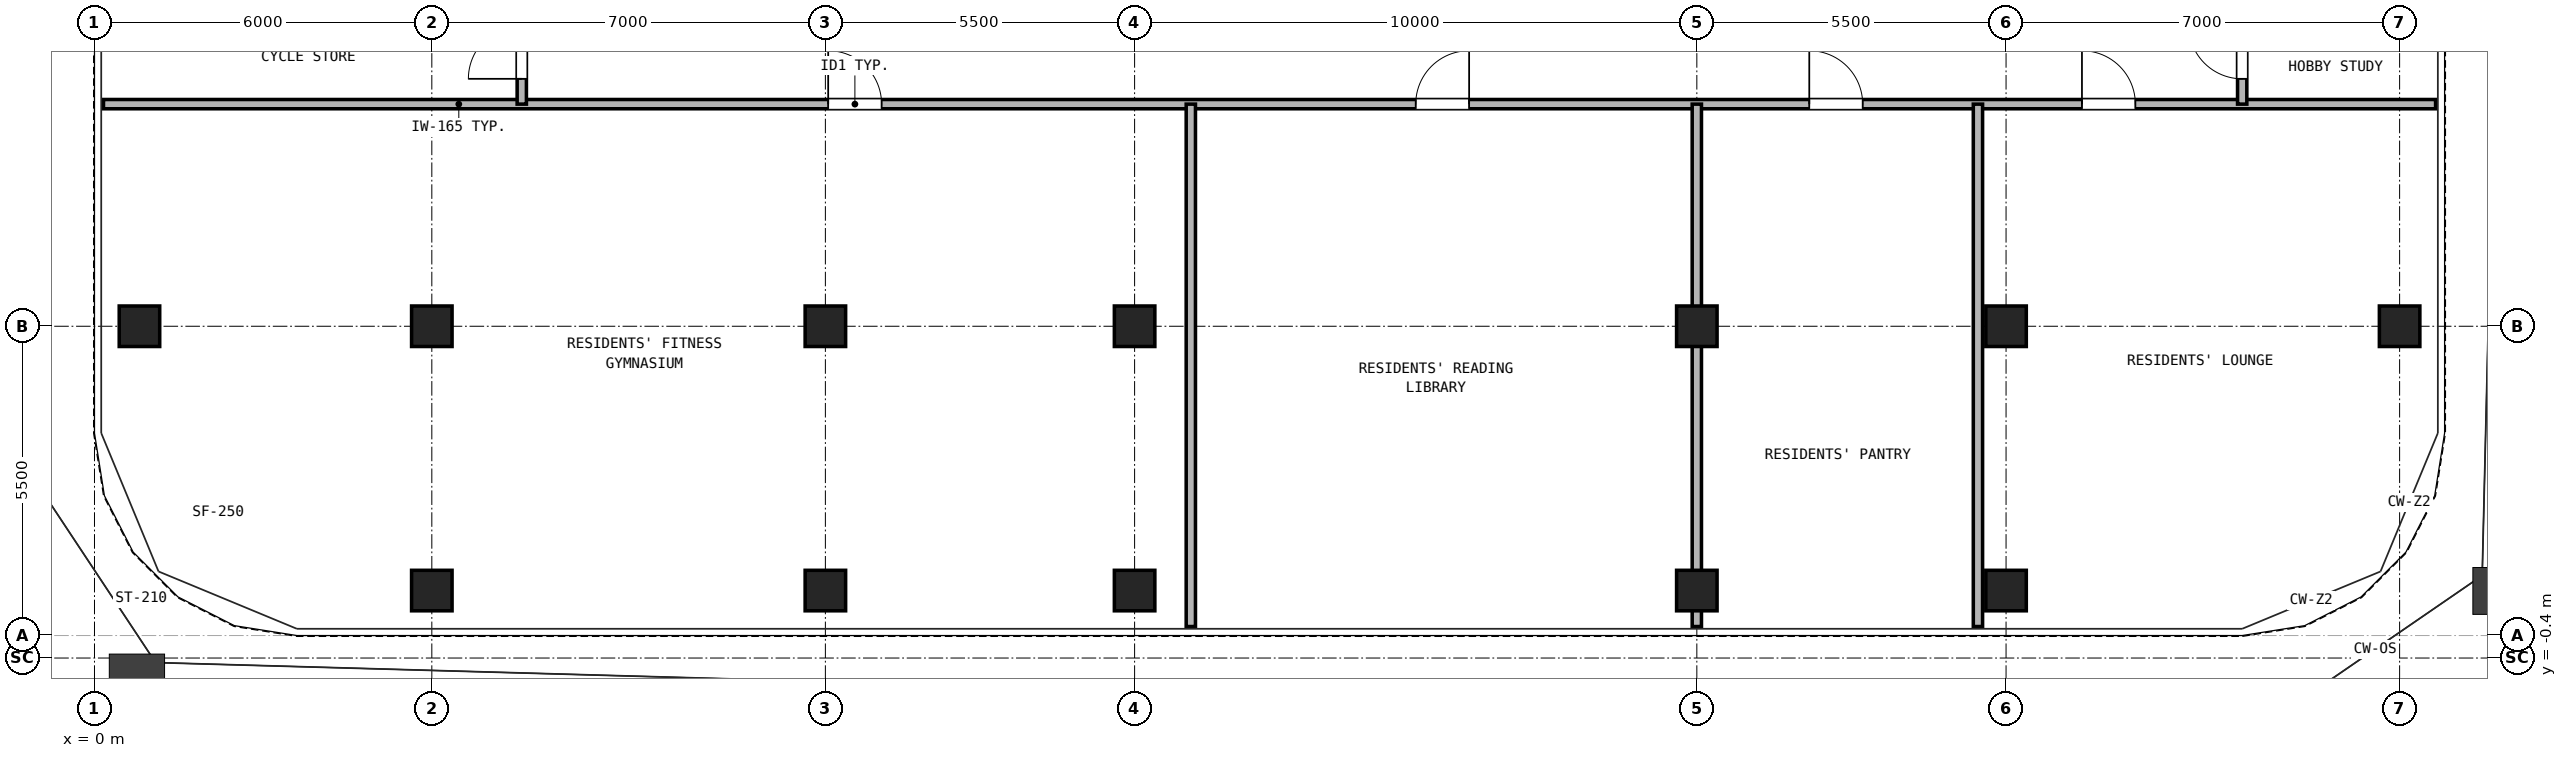
"""IFC4 building model, lengths in metres.
Left out: names, types, materials, properties, quantities, classifications, styles, units other than length and angle.
Written with IfcOpenShell. Run it as: python <this file> out.ifc"""

import sys

from ifc_helpers import new_model, si_unit, direction, frame, frame_2d, origin, origin_2d, place, context, subcontext, project, spatial, rectangle, hollow_rectangle, extrude, source, transform, mapped, element, fill, save


model = new_model("IFC4")
c1 = context("Model", 3, precision=1e-05, world=origin(), true_north=direction((0.0, 1.0)))
c2 = subcontext(c1, "Body", "Model", "MODEL_VIEW")
j1 = project(units=[si_unit("LENGTHUNIT", "METRE"), si_unit("PLANEANGLEUNIT", "RADIAN")], contexts=[c1])
p1 = place(None, origin())
s1 = spatial("IfcSite", under=j1, at=p1, CompositionType="ELEMENT")
p2 = place(p1, origin())
s2 = spatial("IfcBuilding", under=s1, at=p2, CompositionType="ELEMENT")
p3 = place(p2, frame((0.0, 0.0, 168.9)))
s3 = spatial("IfcBuildingStorey", under=s2, at=p3, CompositionType="ELEMENT", Elevation=168.9)
m1 = source(origin(), c2, "Body", "SweptSolid", [
    extrude(hollow_rectangle(XDim=0.72, YDim=0.72, WallThickness=0.04, at=origin_2d()), origin(), (0.0, 0.0, 1.0), 2.95),
])
for number, where, z_axis, x_axis in (
    (1, (6.0, 0.8, 0.0), (0.0, 0.0, 1.0), (1.0, 0.0, 0.0)),
    (2, (13.0, 0.8, 0.0), (0.0, 0.0, 1.0), (1.0, 0.0, 0.0)),
    (3, (18.5, 0.8, 0.0), (0.0, 0.0, 1.0), (1.0, 0.0, 0.0)),
    (4, (28.5, 0.8, 0.0), (0.0, 0.0, 1.0), (1.0, 0.0, 0.0)),
    (5, (34.0, 0.8, 0.0), (0.0, 0.0, 1.0), (1.0, 0.0, 0.0)),
    (6, (0.8, 5.5, 0.0), (0.0, 0.0, 1.0), (1.0, 0.0, 0.0)),
    (7, (41.0, 5.5, 0.0), (0.0, 0.0, 1.0), (1.0, 0.0, 0.0)),
    (8, (6.0, 5.5, 0.0), (0.0, 0.0, 1.0), (1.0, 0.0, 0.0)),
    (9, (13.0, 5.5, 0.0), (0.0, 0.0, 1.0), (1.0, 0.0, 0.0)),
    (10, (18.5, 5.5, 0.0), (0.0, 0.0, 1.0), (1.0, 0.0, 0.0)),
    (11, (28.5, 5.5, 0.0), (0.0, 0.0, 1.0), (1.0, 0.0, 0.0)),
    (12, (34.0, 5.5, 0.0), (0.0, 0.0, 1.0), (1.0, 0.0, 0.0)),
):
    element("IfcColumn", number, at=place(p3, frame(where, z_axis=z_axis, x_axis=x_axis)), inside=s3, PredefinedType="COLUMN", context=c2, shape_type="MappedRepresentation", body=[
        mapped(m1, transform((0.0, 0.0, 0.0), x_axis=(1.0, 0.0, 0.0), y_axis=(0.0, 1.0, 0.0), z_axis=(0.0, 0.0, 1.0), scale=1.0)),
    ])
p4 = place(p3, frame((0.16, 9.45, 0.0), z_axis=(0.0, 0.0, 1.0), x_axis=(1.0, 0.0, 0.0)))
e13 = element("IfcWall", 13, at=p4, inside=s3, PredefinedType="PARTITIONING", context=c2, shape_type="SweptSolid", body=[
    extrude(rectangle(XDim=41.48, YDim=0.165, at=frame_2d((20.74, 0.0))), origin(), (0.0, 0.0, 1.0), 2.95),
])
p5 = place(p4, frame((12.89, 0.0, 0.0)))
e14 = element("IfcOpeningElement", 14, at=p5, cuts=e13, PredefinedType="OPENING", context=c2, shape_type="SweptSolid", body=[
    extrude(rectangle(XDim=0.95, YDim=2.15, at=frame_2d((0.475, 1.075))), frame((0.0, 0.093, 0.0), z_axis=(0.0, -1.0, 0.0), x_axis=(1.0, 0.0, 0.0)), (0.0, 0.0, 1.0), 0.185),
])
p6 = place(p4, frame((23.34, 0.0, 0.0)))
e15 = element("IfcOpeningElement", 15, at=p6, cuts=e13, PredefinedType="OPENING", context=c2, shape_type="SweptSolid", body=[
    extrude(rectangle(XDim=0.95, YDim=2.15, at=frame_2d((0.475, 1.075))), frame((0.0, 0.093, 0.0), z_axis=(0.0, -1.0, 0.0), x_axis=(1.0, 0.0, 0.0)), (0.0, 0.0, 1.0), 0.185),
])
p7 = place(p4, frame((30.34, 0.0, 0.0)))
e16 = element("IfcOpeningElement", 16, at=p7, cuts=e13, PredefinedType="OPENING", context=c2, shape_type="SweptSolid", body=[
    extrude(rectangle(XDim=0.95, YDim=2.15, at=frame_2d((0.475, 1.075))), frame((0.0, 0.093, 0.0), z_axis=(0.0, -1.0, 0.0), x_axis=(1.0, 0.0, 0.0)), (0.0, 0.0, 1.0), 0.185),
])
p8 = place(p4, frame((35.19, 0.0, 0.0)))
e17 = element("IfcOpeningElement", 17, at=p8, cuts=e13, PredefinedType="OPENING", context=c2, shape_type="SweptSolid", body=[
    extrude(rectangle(XDim=0.95, YDim=2.15, at=frame_2d((0.475, 1.075))), frame((0.0, 0.093, 0.0), z_axis=(0.0, -1.0, 0.0), x_axis=(1.0, 0.0, 0.0)), (0.0, 0.0, 1.0), 0.185),
])
p9 = place(p3, frame((7.6, 9.45, 0.0), z_axis=(0.0, 0.0, 1.0), x_axis=(0.0, 1.0, 0.0)))
e18 = element("IfcWall", 18, at=p9, inside=s3, PredefinedType="PARTITIONING", context=c2, shape_type="SweptSolid", body=[
    extrude(rectangle(XDim=2.0, YDim=0.165, at=frame_2d((1.0, 0.0))), origin(), (0.0, 0.0, 1.0), 2.95),
])
p10 = place(p9, frame((0.45, 0.0, 0.0)))
e19 = element("IfcOpeningElement", 19, at=p10, cuts=e18, PredefinedType="OPENING", context=c2, shape_type="SweptSolid", body=[
    extrude(rectangle(XDim=0.95, YDim=2.15, at=frame_2d((0.475, 1.075))), frame((0.0, 0.093, 0.0), z_axis=(0.0, -1.0, 0.0), x_axis=(1.0, 0.0, 0.0)), (0.0, 0.0, 1.0), 0.185),
])
p11 = place(p3, frame((38.2, 9.45, 0.0), z_axis=(0.0, 0.0, 1.0), x_axis=(0.0, 1.0, 0.0)))
e20 = element("IfcWall", 20, at=p11, inside=s3, PredefinedType="PARTITIONING", context=c2, shape_type="SweptSolid", body=[
    extrude(rectangle(XDim=2.0, YDim=0.165, at=frame_2d((1.0, 0.0))), origin(), (0.0, 0.0, 1.0), 2.95),
])
p12 = place(p11, frame((0.45, 0.0, 0.0)))
e21 = element("IfcOpeningElement", 21, at=p12, cuts=e20, PredefinedType="OPENING", context=c2, shape_type="SweptSolid", body=[
    extrude(rectangle(XDim=0.95, YDim=2.15, at=frame_2d((0.475, 1.075))), frame((0.0, 0.093, 0.0), z_axis=(0.0, -1.0, 0.0), x_axis=(1.0, 0.0, 0.0)), (0.0, 0.0, 1.0), 0.185),
])
p13 = place(p3, frame((19.5, 0.16, 0.0), z_axis=(0.0, 0.0, 1.0), x_axis=(0.0, 1.0, 0.0)))
e22 = element("IfcWall", 22, at=p13, inside=s3, PredefinedType="PARTITIONING", context=c2, shape_type="SweptSolid", body=[
    extrude(rectangle(XDim=9.29, YDim=0.165, at=frame_2d((4.645, 0.0))), origin(), (0.0, 0.0, 1.0), 2.95),
])
p14 = place(p3, frame((28.5, 0.16, 0.0), z_axis=(0.0, 0.0, 1.0), x_axis=(0.0, 1.0, 0.0)))
e23 = element("IfcWall", 23, at=p14, inside=s3, PredefinedType="PARTITIONING", context=c2, shape_type="SweptSolid", body=[
    extrude(rectangle(XDim=9.29, YDim=0.165, at=frame_2d((4.645, 0.0))), origin(), (0.0, 0.0, 1.0), 2.323),
])
p15 = place(p3, frame((33.5, 0.16, 0.0), z_axis=(0.0, 0.0, 1.0), x_axis=(0.0, 1.0, 0.0)))
e24 = element("IfcWall", 24, at=p15, inside=s3, PredefinedType="PARTITIONING", context=c2, shape_type="SweptSolid", body=[
    extrude(rectangle(XDim=9.29, YDim=0.165, at=frame_2d((4.645, 0.0))), origin(), (0.0, 0.0, 1.0), 2.95),
])
p16 = place(p5, frame((0.95, 0.0, 0.0), z_axis=(0.0, 0.0, 1.0), x_axis=(-1.0, 0.0, 0.0)))
e25 = element("IfcDoor", 25, at=p16, inside=s3, OperationType="SINGLE_SWING_LEFT", PredefinedType="DOOR", context=c2, shape_type="SweptSolid", body=[
    extrude(rectangle(XDim=0.95, YDim=2.15, at=frame_2d((0.475, 1.075))), frame((0.0, 0.025, 0.0), z_axis=(0.0, -1.0, 0.0), x_axis=(1.0, 0.0, 0.0)), (0.0, 0.0, 1.0), 0.05),
])
fill(e14, e25)
p17 = place(p6, frame((0.95, 0.0, 0.0), z_axis=(0.0, 0.0, 1.0), x_axis=(-1.0, 0.0, 0.0)))
e26 = element("IfcDoor", 26, at=p17, inside=s3, OperationType="SINGLE_SWING_RIGHT", PredefinedType="DOOR", context=c2, shape_type="SweptSolid", body=[
    extrude(rectangle(XDim=0.95, YDim=2.15, at=frame_2d((0.475, 1.075))), frame((0.0, 0.025, 0.0), z_axis=(0.0, -1.0, 0.0), x_axis=(1.0, 0.0, 0.0)), (0.0, 0.0, 1.0), 0.05),
])
fill(e15, e26)
p18 = place(p7, frame((0.95, 0.0, 0.0), z_axis=(0.0, 0.0, 1.0), x_axis=(-1.0, 0.0, 0.0)))
e27 = element("IfcDoor", 27, at=p18, inside=s3, OperationType="SINGLE_SWING_LEFT", PredefinedType="DOOR", context=c2, shape_type="SweptSolid", body=[
    extrude(rectangle(XDim=0.95, YDim=2.15, at=frame_2d((0.475, 1.075))), frame((0.0, 0.025, 0.0), z_axis=(0.0, -1.0, 0.0), x_axis=(1.0, 0.0, 0.0)), (0.0, 0.0, 1.0), 0.05),
])
fill(e16, e27)
p19 = place(p8, frame((0.95, 0.0, 0.0), z_axis=(0.0, 0.0, 1.0), x_axis=(-1.0, 0.0, 0.0)))
e28 = element("IfcDoor", 28, at=p19, inside=s3, OperationType="SINGLE_SWING_LEFT", PredefinedType="DOOR", context=c2, shape_type="SweptSolid", body=[
    extrude(rectangle(XDim=0.95, YDim=2.15, at=frame_2d((0.475, 1.075))), frame((0.0, 0.025, 0.0), z_axis=(0.0, -1.0, 0.0), x_axis=(1.0, 0.0, 0.0)), (0.0, 0.0, 1.0), 0.05),
])
fill(e17, e28)
p20 = place(p10, frame((0.95, 0.0, 0.0), z_axis=(0.0, 0.0, 1.0), x_axis=(-1.0, 0.0, 0.0)))
e29 = element("IfcDoor", 29, at=p20, inside=s3, OperationType="SINGLE_SWING_LEFT", PredefinedType="DOOR", context=c2, shape_type="SweptSolid", body=[
    extrude(rectangle(XDim=0.95, YDim=2.15, at=frame_2d((0.475, 1.075))), frame((0.0, 0.025, 0.0), z_axis=(0.0, -1.0, 0.0), x_axis=(1.0, 0.0, 0.0)), (0.0, 0.0, 1.0), 0.05),
])
fill(e19, e29)
p21 = place(p12, origin())
e30 = element("IfcDoor", 30, at=p21, inside=s3, OperationType="SINGLE_SWING_RIGHT", PredefinedType="DOOR", context=c2, shape_type="SweptSolid", body=[
    extrude(rectangle(XDim=0.95, YDim=2.15, at=frame_2d((0.475, 1.075))), frame((0.0, 0.025, 0.0), z_axis=(0.0, -1.0, 0.0), x_axis=(1.0, 0.0, 0.0)), (0.0, 0.0, 1.0), 0.05),
])
fill(e21, e30)
save(model, sys.argv[1])
